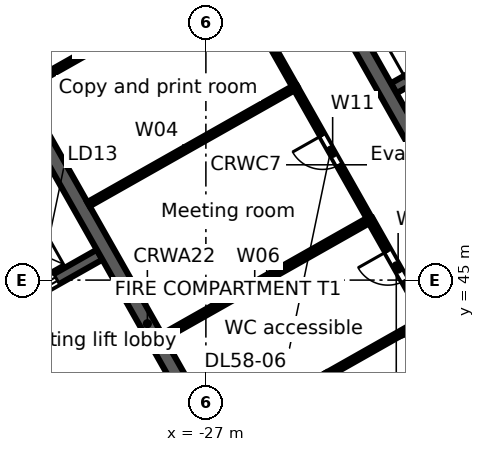
"""IFC4 building model, lengths in metres.
Left out: names, types, materials, properties, quantities, classifications, styles, units other than length and angle.
Written with IfcOpenShell. Run it as: python <this file> out.ifc"""

import sys

from ifc_helpers import new_model, si_unit, direction, frame, frame_2d, origin, place, context, subcontext, project, spatial, rectangle, extrude, element, fill, save


model = new_model("IFC4")
c1 = context("Model", 3, precision=1e-05, world=origin(), true_north=direction((0.0, 1.0)))
c2 = subcontext(c1, "Body", "Model", "MODEL_VIEW")
j1 = project(units=[si_unit("LENGTHUNIT", "METRE"), si_unit("PLANEANGLEUNIT", "RADIAN")], contexts=[c1])
p1 = place(None, origin())
s1 = spatial("IfcSite", under=j1, at=p1, CompositionType="ELEMENT")
p2 = place(p1, origin())
s2 = spatial("IfcBuilding", under=s1, at=p2, CompositionType="ELEMENT")
p3 = place(p2, frame((0.0, 0.0, 262.7)))
s3 = spatial("IfcBuildingStorey", under=s2, at=p3, CompositionType="ELEMENT", Elevation=262.7)
p4 = place(p3, frame((-58.732, 38.771, 0.0), z_axis=(0.0, 0.0, 1.0), x_axis=(0.870355615581, 0.492423702137, 0.0)))
e1 = element("IfcWall", 1, at=p4, inside=s3, PredefinedType="STANDARD", context=c2, shape_type="SweptSolid", body=[
    extrude(rectangle(XDim=64.052, YDim=0.25, at=frame_2d((32.026, 0.0))), origin(), (0.0, 0.0, 1.0), 3.52),
])
p5 = place(p4, frame((61.259, 0.0, 0.8)))
e2 = element("IfcOpeningElement", 2, at=p5, cuts=e1, PredefinedType="OPENING", context=c2, shape_type="SweptSolid", body=[
    extrude(rectangle(XDim=2.4, YDim=2.2, at=frame_2d((1.2, 1.1))), frame((0.0, 0.135, 0.0), z_axis=(0.0, -1.0, 0.0), x_axis=(1.0, 0.0, 0.0)), (0.0, 0.0, 1.0), 0.27),
])
p6 = place(p4, frame((58.216, 0.0, 0.8)))
e3 = element("IfcOpeningElement", 3, at=p6, cuts=e1, PredefinedType="OPENING", context=c2, shape_type="SweptSolid", body=[
    extrude(rectangle(XDim=2.4, YDim=2.2, at=frame_2d((1.2, 1.1))), frame((0.0, 0.135, 0.0), z_axis=(0.0, -1.0, 0.0), x_axis=(1.0, 0.0, 0.0)), (0.0, 0.0, 1.0), 0.27),
])
p7 = place(p4, frame((55.173, 0.0, 0.8)))
e4 = element("IfcOpeningElement", 4, at=p7, cuts=e1, PredefinedType="OPENING", context=c2, shape_type="SweptSolid", body=[
    extrude(rectangle(XDim=2.4, YDim=2.2, at=frame_2d((1.2, 1.1))), frame((0.0, 0.135, 0.0), z_axis=(0.0, -1.0, 0.0), x_axis=(1.0, 0.0, 0.0)), (0.0, 0.0, 1.0), 0.27),
])
p8 = place(p4, frame((52.129, 0.0, 0.8)))
e5 = element("IfcOpeningElement", 5, at=p8, cuts=e1, PredefinedType="OPENING", context=c2, shape_type="SweptSolid", body=[
    extrude(rectangle(XDim=2.4, YDim=2.2, at=frame_2d((1.2, 1.1))), frame((0.0, 0.135, 0.0), z_axis=(0.0, -1.0, 0.0), x_axis=(1.0, 0.0, 0.0)), (0.0, 0.0, 1.0), 0.27),
])
p9 = place(p4, frame((49.086, 0.0, 0.8)))
e6 = element("IfcOpeningElement", 6, at=p9, cuts=e1, PredefinedType="OPENING", context=c2, shape_type="SweptSolid", body=[
    extrude(rectangle(XDim=2.4, YDim=2.2, at=frame_2d((1.2, 1.1))), frame((0.0, 0.135, 0.0), z_axis=(0.0, -1.0, 0.0), x_axis=(1.0, 0.0, 0.0)), (0.0, 0.0, 1.0), 0.27),
])
p10 = place(p4, frame((46.043, 0.0, 0.8)))
e7 = element("IfcOpeningElement", 7, at=p10, cuts=e1, PredefinedType="OPENING", context=c2, shape_type="SweptSolid", body=[
    extrude(rectangle(XDim=2.4, YDim=2.2, at=frame_2d((1.2, 1.1))), frame((0.0, 0.135, 0.0), z_axis=(0.0, -1.0, 0.0), x_axis=(1.0, 0.0, 0.0)), (0.0, 0.0, 1.0), 0.27),
])
p11 = place(p4, frame((43.0, 0.0, 0.8)))
e8 = element("IfcOpeningElement", 8, at=p11, cuts=e1, PredefinedType="OPENING", context=c2, shape_type="SweptSolid", body=[
    extrude(rectangle(XDim=2.4, YDim=2.2, at=frame_2d((1.2, 1.1))), frame((0.0, 0.135, 0.0), z_axis=(0.0, -1.0, 0.0), x_axis=(1.0, 0.0, 0.0)), (0.0, 0.0, 1.0), 0.27),
])
p12 = place(p4, frame((39.956, 0.0, 0.8)))
e9 = element("IfcOpeningElement", 9, at=p12, cuts=e1, PredefinedType="OPENING", context=c2, shape_type="SweptSolid", body=[
    extrude(rectangle(XDim=2.4, YDim=2.2, at=frame_2d((1.2, 1.1))), frame((0.0, 0.135, 0.0), z_axis=(0.0, -1.0, 0.0), x_axis=(1.0, 0.0, 0.0)), (0.0, 0.0, 1.0), 0.27),
])
p13 = place(p4, frame((36.913, 0.0, 0.8)))
e10 = element("IfcOpeningElement", 10, at=p13, cuts=e1, PredefinedType="OPENING", context=c2, shape_type="SweptSolid", body=[
    extrude(rectangle(XDim=2.4, YDim=2.2, at=frame_2d((1.2, 1.1))), frame((0.0, 0.135, 0.0), z_axis=(0.0, -1.0, 0.0), x_axis=(1.0, 0.0, 0.0)), (0.0, 0.0, 1.0), 0.27),
])
p14 = place(p4, frame((33.87, 0.0, 0.8)))
e11 = element("IfcOpeningElement", 11, at=p14, cuts=e1, PredefinedType="OPENING", context=c2, shape_type="SweptSolid", body=[
    extrude(rectangle(XDim=2.4, YDim=2.2, at=frame_2d((1.2, 1.1))), frame((0.0, 0.135, 0.0), z_axis=(0.0, -1.0, 0.0), x_axis=(1.0, 0.0, 0.0)), (0.0, 0.0, 1.0), 0.27),
])
p15 = place(p4, frame((30.826, 0.0, 0.8)))
e12 = element("IfcOpeningElement", 12, at=p15, cuts=e1, PredefinedType="OPENING", context=c2, shape_type="SweptSolid", body=[
    extrude(rectangle(XDim=2.4, YDim=2.2, at=frame_2d((1.2, 1.1))), frame((0.0, 0.135, 0.0), z_axis=(0.0, -1.0, 0.0), x_axis=(1.0, 0.0, 0.0)), (0.0, 0.0, 1.0), 0.27),
])
p16 = place(p4, frame((27.783, 0.0, 0.8)))
e13 = element("IfcOpeningElement", 13, at=p16, cuts=e1, PredefinedType="OPENING", context=c2, shape_type="SweptSolid", body=[
    extrude(rectangle(XDim=2.4, YDim=2.2, at=frame_2d((1.2, 1.1))), frame((0.0, 0.135, 0.0), z_axis=(0.0, -1.0, 0.0), x_axis=(1.0, 0.0, 0.0)), (0.0, 0.0, 1.0), 0.27),
])
p17 = place(p4, frame((24.74, 0.0, 0.8)))
e14 = element("IfcOpeningElement", 14, at=p17, cuts=e1, PredefinedType="OPENING", context=c2, shape_type="SweptSolid", body=[
    extrude(rectangle(XDim=2.4, YDim=2.2, at=frame_2d((1.2, 1.1))), frame((0.0, 0.135, 0.0), z_axis=(0.0, -1.0, 0.0), x_axis=(1.0, 0.0, 0.0)), (0.0, 0.0, 1.0), 0.27),
])
p18 = place(p4, frame((21.696, 0.0, 0.8)))
e15 = element("IfcOpeningElement", 15, at=p18, cuts=e1, PredefinedType="OPENING", context=c2, shape_type="SweptSolid", body=[
    extrude(rectangle(XDim=2.4, YDim=2.2, at=frame_2d((1.2, 1.1))), frame((0.0, 0.135, 0.0), z_axis=(0.0, -1.0, 0.0), x_axis=(1.0, 0.0, 0.0)), (0.0, 0.0, 1.0), 0.27),
])
p19 = place(p4, frame((18.653, 0.0, 0.8)))
e16 = element("IfcOpeningElement", 16, at=p19, cuts=e1, PredefinedType="OPENING", context=c2, shape_type="SweptSolid", body=[
    extrude(rectangle(XDim=2.4, YDim=2.2, at=frame_2d((1.2, 1.1))), frame((0.0, 0.135, 0.0), z_axis=(0.0, -1.0, 0.0), x_axis=(1.0, 0.0, 0.0)), (0.0, 0.0, 1.0), 0.27),
])
p20 = place(p4, frame((15.61, 0.0, 0.8)))
e17 = element("IfcOpeningElement", 17, at=p20, cuts=e1, PredefinedType="OPENING", context=c2, shape_type="SweptSolid", body=[
    extrude(rectangle(XDim=2.4, YDim=2.2, at=frame_2d((1.2, 1.1))), frame((0.0, 0.135, 0.0), z_axis=(0.0, -1.0, 0.0), x_axis=(1.0, 0.0, 0.0)), (0.0, 0.0, 1.0), 0.27),
])
p21 = place(p4, frame((12.567, 0.0, 0.8)))
e18 = element("IfcOpeningElement", 18, at=p21, cuts=e1, PredefinedType="OPENING", context=c2, shape_type="SweptSolid", body=[
    extrude(rectangle(XDim=2.4, YDim=2.2, at=frame_2d((1.2, 1.1))), frame((0.0, 0.135, 0.0), z_axis=(0.0, -1.0, 0.0), x_axis=(1.0, 0.0, 0.0)), (0.0, 0.0, 1.0), 0.27),
])
p22 = place(p4, frame((9.523, 0.0, 0.8)))
e19 = element("IfcOpeningElement", 19, at=p22, cuts=e1, PredefinedType="OPENING", context=c2, shape_type="SweptSolid", body=[
    extrude(rectangle(XDim=2.4, YDim=2.2, at=frame_2d((1.2, 1.1))), frame((0.0, 0.135, 0.0), z_axis=(0.0, -1.0, 0.0), x_axis=(1.0, 0.0, 0.0)), (0.0, 0.0, 1.0), 0.27),
])
p23 = place(p4, frame((6.48, 0.0, 0.8)))
e20 = element("IfcOpeningElement", 20, at=p23, cuts=e1, PredefinedType="OPENING", context=c2, shape_type="SweptSolid", body=[
    extrude(rectangle(XDim=2.4, YDim=2.2, at=frame_2d((1.2, 1.1))), frame((0.0, 0.135, 0.0), z_axis=(0.0, -1.0, 0.0), x_axis=(1.0, 0.0, 0.0)), (0.0, 0.0, 1.0), 0.27),
])
p24 = place(p4, frame((3.437, 0.0, 0.8)))
e21 = element("IfcOpeningElement", 21, at=p24, cuts=e1, PredefinedType="OPENING", context=c2, shape_type="SweptSolid", body=[
    extrude(rectangle(XDim=2.4, YDim=2.2, at=frame_2d((1.2, 1.1))), frame((0.0, 0.135, 0.0), z_axis=(0.0, -1.0, 0.0), x_axis=(1.0, 0.0, 0.0)), (0.0, 0.0, 1.0), 0.27),
])
p25 = place(p4, frame((0.393, 0.0, 0.8)))
e22 = element("IfcOpeningElement", 22, at=p25, cuts=e1, PredefinedType="OPENING", context=c2, shape_type="SweptSolid", body=[
    extrude(rectangle(XDim=2.4, YDim=2.2, at=frame_2d((1.2, 1.1))), frame((0.0, 0.135, 0.0), z_axis=(0.0, -1.0, 0.0), x_axis=(1.0, 0.0, 0.0)), (0.0, 0.0, 1.0), 0.27),
])
p26 = place(p3, frame((-3.017, 46.293, 0.0), z_axis=(0.0, 0.0, 1.0), x_axis=(-0.870355474887, -0.492423950812, 0.0)))
e23 = element("IfcWall", 23, at=p26, inside=s3, PredefinedType="STANDARD", context=c2, shape_type="SweptSolid", body=[
    extrude(rectangle(XDim=40.34, YDim=0.25, at=frame_2d((20.17, 0.0))), origin(), (0.0, 0.0, 1.0), 3.52),
])
p27 = place(p26, frame((37.428, 0.0, 0.8)))
e24 = element("IfcOpeningElement", 24, at=p27, cuts=e23, PredefinedType="OPENING", context=c2, shape_type="SweptSolid", body=[
    extrude(rectangle(XDim=2.4, YDim=2.2, at=frame_2d((1.2, 1.1))), frame((0.0, 0.135, 0.0), z_axis=(0.0, -1.0, 0.0), x_axis=(1.0, 0.0, 0.0)), (0.0, 0.0, 1.0), 0.27),
])
p28 = place(p26, frame((34.372, 0.0, 0.0)))
e25 = element("IfcOpeningElement", 25, at=p28, cuts=e23, PredefinedType="OPENING", context=c2, shape_type="SweptSolid", body=[
    extrude(rectangle(XDim=1.8, YDim=2.4, at=frame_2d((0.9, 1.2))), frame((0.0, 0.135, 0.0), z_axis=(0.0, -1.0, 0.0), x_axis=(1.0, 0.0, 0.0)), (0.0, 0.0, 1.0), 0.27),
])
p29 = place(p26, frame((30.716, 0.0, 0.8)))
e26 = element("IfcOpeningElement", 26, at=p29, cuts=e23, PredefinedType="OPENING", context=c2, shape_type="SweptSolid", body=[
    extrude(rectangle(XDim=2.4, YDim=2.2, at=frame_2d((1.2, 1.1))), frame((0.0, 0.135, 0.0), z_axis=(0.0, -1.0, 0.0), x_axis=(1.0, 0.0, 0.0)), (0.0, 0.0, 1.0), 0.27),
])
p30 = place(p26, frame((27.36, 0.0, 0.8)))
e27 = element("IfcOpeningElement", 27, at=p30, cuts=e23, PredefinedType="OPENING", context=c2, shape_type="SweptSolid", body=[
    extrude(rectangle(XDim=2.4, YDim=2.2, at=frame_2d((1.2, 1.1))), frame((0.0, 0.135, 0.0), z_axis=(0.0, -1.0, 0.0), x_axis=(1.0, 0.0, 0.0)), (0.0, 0.0, 1.0), 0.27),
])
p31 = place(p26, frame((24.304, 0.0, 0.0)))
e28 = element("IfcOpeningElement", 28, at=p31, cuts=e23, PredefinedType="OPENING", context=c2, shape_type="SweptSolid", body=[
    extrude(rectangle(XDim=1.8, YDim=2.4, at=frame_2d((0.9, 1.2))), frame((0.0, 0.135, 0.0), z_axis=(0.0, -1.0, 0.0), x_axis=(1.0, 0.0, 0.0)), (0.0, 0.0, 1.0), 0.27),
])
p32 = place(p26, frame((20.648, 0.0, 0.8)))
e29 = element("IfcOpeningElement", 29, at=p32, cuts=e23, PredefinedType="OPENING", context=c2, shape_type="SweptSolid", body=[
    extrude(rectangle(XDim=2.4, YDim=2.2, at=frame_2d((1.2, 1.1))), frame((0.0, 0.135, 0.0), z_axis=(0.0, -1.0, 0.0), x_axis=(1.0, 0.0, 0.0)), (0.0, 0.0, 1.0), 0.27),
])
p33 = place(p26, frame((17.292, 0.0, 0.8)))
e30 = element("IfcOpeningElement", 30, at=p33, cuts=e23, PredefinedType="OPENING", context=c2, shape_type="SweptSolid", body=[
    extrude(rectangle(XDim=2.4, YDim=2.2, at=frame_2d((1.2, 1.1))), frame((0.0, 0.135, 0.0), z_axis=(0.0, -1.0, 0.0), x_axis=(1.0, 0.0, 0.0)), (0.0, 0.0, 1.0), 0.27),
])
p34 = place(p26, frame((14.236, 0.0, 0.0)))
e31 = element("IfcOpeningElement", 31, at=p34, cuts=e23, PredefinedType="OPENING", context=c2, shape_type="SweptSolid", body=[
    extrude(rectangle(XDim=1.8, YDim=2.4, at=frame_2d((0.9, 1.2))), frame((0.0, 0.135, 0.0), z_axis=(0.0, -1.0, 0.0), x_axis=(1.0, 0.0, 0.0)), (0.0, 0.0, 1.0), 0.27),
])
p35 = place(p26, frame((10.58, 0.0, 0.8)))
e32 = element("IfcOpeningElement", 32, at=p35, cuts=e23, PredefinedType="OPENING", context=c2, shape_type="SweptSolid", body=[
    extrude(rectangle(XDim=2.4, YDim=2.2, at=frame_2d((1.2, 1.1))), frame((0.0, 0.135, 0.0), z_axis=(0.0, -1.0, 0.0), x_axis=(1.0, 0.0, 0.0)), (0.0, 0.0, 1.0), 0.27),
])
p36 = place(p26, frame((7.224, 0.0, 0.8)))
e33 = element("IfcOpeningElement", 33, at=p36, cuts=e23, PredefinedType="OPENING", context=c2, shape_type="SweptSolid", body=[
    extrude(rectangle(XDim=2.4, YDim=2.2, at=frame_2d((1.2, 1.1))), frame((0.0, 0.135, 0.0), z_axis=(0.0, -1.0, 0.0), x_axis=(1.0, 0.0, 0.0)), (0.0, 0.0, 1.0), 0.27),
])
p37 = place(p26, frame((4.168, 0.0, 0.0)))
e34 = element("IfcOpeningElement", 34, at=p37, cuts=e23, PredefinedType="OPENING", context=c2, shape_type="SweptSolid", body=[
    extrude(rectangle(XDim=1.8, YDim=2.4, at=frame_2d((0.9, 1.2))), frame((0.0, 0.135, 0.0), z_axis=(0.0, -1.0, 0.0), x_axis=(1.0, 0.0, 0.0)), (0.0, 0.0, 1.0), 0.27),
])
p38 = place(p26, frame((0.512, 0.0, 0.8)))
e35 = element("IfcOpeningElement", 35, at=p38, cuts=e23, PredefinedType="OPENING", context=c2, shape_type="SweptSolid", body=[
    extrude(rectangle(XDim=2.4, YDim=2.2, at=frame_2d((1.2, 1.1))), frame((0.0, 0.135, 0.0), z_axis=(0.0, -1.0, 0.0), x_axis=(1.0, 0.0, 0.0)), (0.0, 0.0, 1.0), 0.27),
])
p39 = place(p3, frame((-37.282, 41.435, 0.0), z_axis=(0.0, 0.0, 1.0), x_axis=(0.870361315115, 0.492413628113, 0.0)))
e36 = element("IfcWall", 36, at=p39, inside=s3, PredefinedType="SOLIDWALL", context=c2, shape_type="SweptSolid", body=[
    extrude(rectangle(XDim=8.6, YDim=0.3, at=frame_2d((4.3, 0.0))), origin(), (0.0, 0.0, 1.0), 3.52),
])
p40 = place(p39, frame((0.65, 0.0, 0.0)))
e37 = element("IfcOpeningElement", 37, at=p40, cuts=e36, PredefinedType="OPENING", context=c2, shape_type="SweptSolid", body=[
    extrude(rectangle(XDim=1.1, YDim=2.1, at=frame_2d((0.55, 1.05))), frame((0.0, 0.16, 0.0), z_axis=(0.0, -1.0, 0.0), x_axis=(1.0, 0.0, 0.0)), (0.0, 0.0, 1.0), 0.32),
])
p41 = place(p39, frame((3.05, 0.0, 0.0)))
e38 = element("IfcOpeningElement", 38, at=p41, cuts=e36, PredefinedType="OPENING", context=c2, shape_type="SweptSolid", body=[
    extrude(rectangle(XDim=1.1, YDim=2.1, at=frame_2d((0.55, 1.05))), frame((0.0, 0.16, 0.0), z_axis=(0.0, -1.0, 0.0), x_axis=(1.0, 0.0, 0.0)), (0.0, 0.0, 1.0), 0.32),
])
p42 = place(p39, frame((6.2, 0.0, 0.0)))
e39 = element("IfcOpeningElement", 39, at=p42, cuts=e36, PredefinedType="OPENING", context=c2, shape_type="SweptSolid", body=[
    extrude(rectangle(XDim=1.1, YDim=2.1, at=frame_2d((0.55, 1.05))), frame((0.0, 0.16, 0.0), z_axis=(0.0, -1.0, 0.0), x_axis=(1.0, 0.0, 0.0)), (0.0, 0.0, 1.0), 0.32),
])
p43 = place(p3, frame((-33.031, 43.667, 0.0), z_axis=(0.0, 0.0, 1.0), x_axis=(0.492408451753, -0.87036424366, 0.0)))
e40 = element("IfcWall", 40, at=p43, inside=s3, PredefinedType="PARTITIONING", context=c2, shape_type="SweptSolid", body=[
    extrude(rectangle(XDim=4.1, YDim=0.2, at=frame_2d((2.05, 0.0))), origin(), (0.0, 0.0, 1.0), 3.52),
])
p44 = place(p43, frame((1.55, 0.0, 0.0)))
e41 = element("IfcOpeningElement", 41, at=p44, cuts=e40, PredefinedType="OPENING", context=c2, shape_type="SweptSolid", body=[
    extrude(rectangle(XDim=1.0, YDim=2.1, at=frame_2d((0.5, 1.05))), frame((0.0, 0.11, 0.0), z_axis=(0.0, -1.0, 0.0), x_axis=(1.0, 0.0, 0.0)), (0.0, 0.0, 1.0), 0.22),
])
p45 = place(p3, frame((-31.79, 49.597, 0.0), z_axis=(0.0, 0.0, 1.0), x_axis=(0.492421663121, -0.870356769198, 0.0)))
e42 = element("IfcWall", 42, at=p45, inside=s3, PredefinedType="SOLIDWALL", context=c2, shape_type="SweptSolid", body=[
    extrude(rectangle(XDim=13.2, YDim=0.4, at=frame_2d((6.6, 0.0))), origin(), (0.0, 0.0, 1.0), 3.52),
])
p46 = place(p3, frame((-22.059, 50.047, 0.0), z_axis=(0.0, 0.0, 1.0), x_axis=(0.87035077051, 0.49243226567, 0.0)))
e43 = element("IfcWall", 43, at=p46, inside=s3, PredefinedType="SOLIDWALL", context=c2, shape_type="SweptSolid", body=[
    extrude(rectangle(XDim=7.4, YDim=0.3, at=frame_2d((3.7, 0.0))), origin(), (0.0, 0.0, 1.0), 3.52),
])
p47 = place(p46, frame((0.4, 0.0, 0.0)))
e44 = element("IfcOpeningElement", 44, at=p47, cuts=e43, PredefinedType="OPENING", context=c2, shape_type="SweptSolid", body=[
    extrude(rectangle(XDim=1.0, YDim=2.1, at=frame_2d((0.5, 1.05))), frame((0.0, 0.16, 0.0), z_axis=(0.0, -1.0, 0.0), x_axis=(1.0, 0.0, 0.0)), (0.0, 0.0, 1.0), 0.32),
])
p48 = place(p3, frame((-24.4, 53.779, 0.0), z_axis=(0.0, 0.0, 1.0), x_axis=(0.492421663121, -0.870356769198, 0.0)))
e45 = element("IfcWall", 45, at=p48, inside=s3, PredefinedType="SOLIDWALL", context=c2, shape_type="SweptSolid", body=[
    extrude(rectangle(XDim=13.2, YDim=0.4, at=frame_2d((6.6, 0.0))), origin(), (0.0, 0.0, 1.0), 3.52),
])
p49 = place(p3, frame((-31.812, 50.044, 0.0), z_axis=(0.0, 0.0, 1.0), x_axis=(0.870309075431, 0.492505952474, 0.0)))
e46 = element("IfcWall", 46, at=p49, inside=s3, PredefinedType="PARTITIONING", context=c2, shape_type="SweptSolid", body=[
    extrude(rectangle(XDim=4.5, YDim=0.125, at=frame_2d((2.25, 0.0))), origin(), (0.0, 0.0, 1.0), 3.52),
])
p50 = place(p3, frame((-30.089, 46.998, 0.0), z_axis=(0.0, 0.0, 1.0), x_axis=(0.870424575418, 0.492301796167, 0.0)))
e47 = element("IfcWall", 47, at=p50, inside=s3, PredefinedType="PARTITIONING", context=c2, shape_type="SweptSolid", body=[
    extrude(rectangle(XDim=6.25, YDim=0.125, at=frame_2d((3.125, 0.0))), origin(), (0.0, 0.0, 1.0), 3.52),
])
p51 = place(p3, frame((-28.119, 43.516, 0.0), z_axis=(0.0, 0.0, 1.0), x_axis=(0.870310250913, 0.49250387527, 0.0)))
e48 = element("IfcWall", 48, at=p51, inside=s3, PredefinedType="PARTITIONING", context=c2, shape_type="SweptSolid", body=[
    extrude(rectangle(XDim=6.25, YDim=0.15, at=frame_2d((3.125, 0.0))), origin(), (0.0, 0.0, 1.0), 2.792),
])
p52 = place(p3, frame((-26.373, 53.122, 0.0), z_axis=(0.0, 0.0, 1.0), x_axis=(0.492454723656, -0.870338063714, 0.0)))
e49 = element("IfcWall", 49, at=p52, inside=s3, PredefinedType="PARTITIONING", context=c2, shape_type="SweptSolid", body=[
    extrude(rectangle(XDim=3.501, YDim=0.125, at=frame_2d((1.75, 0.0))), origin(), (0.0, 0.0, 1.0), 3.52),
])
p53 = place(p52, frame((1.2, 0.0, 0.0)))
e50 = element("IfcOpeningElement", 50, at=p53, cuts=e49, PredefinedType="OPENING", context=c2, shape_type="SweptSolid", body=[
    extrude(rectangle(XDim=0.9, YDim=2.1, at=frame_2d((0.45, 1.05))), frame((0.0, 0.073, 0.0), z_axis=(0.0, -1.0, 0.0), x_axis=(1.0, 0.0, 0.0)), (0.0, 0.0, 1.0), 0.145),
])
p54 = place(p3, frame((-24.649, 50.075, 0.0), z_axis=(0.0, 0.0, 1.0), x_axis=(0.492340861121, -0.870402479587, 0.0)))
e51 = element("IfcWall", 51, at=p54, inside=s3, PredefinedType="PARTITIONING", context=c2, shape_type="SweptSolid", body=[
    extrude(rectangle(XDim=3.999, YDim=0.125, at=frame_2d((2.0, 0.0))), origin(), (0.0, 0.0, 1.0), 2.792),
])
p55 = place(p54, frame((1.45, 0.0, 0.0)))
e52 = element("IfcOpeningElement", 52, at=p55, cuts=e51, PredefinedType="OPENING", context=c2, shape_type="SweptSolid", body=[
    extrude(rectangle(XDim=0.9, YDim=2.1, at=frame_2d((0.45, 1.05))), frame((0.0, 0.073, 0.0), z_axis=(0.0, -1.0, 0.0), x_axis=(1.0, 0.0, 0.0)), (0.0, 0.0, 1.0), 0.145),
])
p56 = place(p3, frame((-23.813, 42.506, 0.0), z_axis=(0.0, 0.0, 1.0), x_axis=(0.870423351516, 0.492303960105, 0.0)))
e53 = element("IfcWall", 53, at=p56, inside=s3, PredefinedType="PARTITIONING", context=c2, shape_type="SweptSolid", body=[
    extrude(rectangle(XDim=3.0, YDim=0.125, at=frame_2d((1.5, 0.0))), origin(), (0.0, 0.0, 1.0), 3.52),
])
p57 = place(p3, frame((-22.68, 46.594, 0.0), z_axis=(0.0, 0.0, 1.0), x_axis=(0.492612172641, -0.870248957119, 0.0)))
e54 = element("IfcWall", 54, at=p57, inside=s3, PredefinedType="PARTITIONING", context=c2, shape_type="SweptSolid", body=[
    extrude(rectangle(XDim=3.0, YDim=0.15, at=frame_2d((1.5, 0.0))), origin(), (0.0, 0.0, 1.0), 3.52),
])
p58 = place(p57, frame((0.95, 0.0, 0.0)))
e55 = element("IfcOpeningElement", 55, at=p58, cuts=e54, PredefinedType="OPENING", context=c2, shape_type="SweptSolid", body=[
    extrude(rectangle(XDim=0.9, YDim=2.1, at=frame_2d((0.45, 1.05))), frame((0.0, 0.085, 0.0), z_axis=(0.0, -1.0, 0.0), x_axis=(1.0, 0.0, 0.0)), (0.0, 0.0, 1.0), 0.17),
])
p59 = place(p42, origin())
e56 = element("IfcDoor", 56, at=p59, inside=s3, OperationType="DOUBLE_DOOR_SLIDING", PredefinedType="DOOR", context=c2, shape_type="SweptSolid", body=[
    extrude(rectangle(XDim=1.1, YDim=2.1, at=frame_2d((0.55, 1.05))), frame((0.0, 0.025, 0.0), z_axis=(0.0, -1.0, 0.0), x_axis=(1.0, 0.0, 0.0)), (0.0, 0.0, 1.0), 0.05),
])
fill(e39, e56)
p60 = place(p58, frame((0.9, 0.0, 0.0), z_axis=(0.0, 0.0, 1.0), x_axis=(-1.0, 0.0, 0.0)))
e57 = element("IfcDoor", 57, at=p60, inside=s3, OperationType="SINGLE_SWING_RIGHT", PredefinedType="DOOR", context=c2, shape_type="SweptSolid", body=[
    extrude(rectangle(XDim=0.9, YDim=2.1, at=frame_2d((0.45, 1.05))), frame((0.0, 0.025, 0.0), z_axis=(0.0, -1.0, 0.0), x_axis=(1.0, 0.0, 0.0)), (0.0, 0.0, 1.0), 0.05),
])
fill(e55, e57)
p61 = place(p55, frame((0.9, 0.0, 0.0), z_axis=(0.0, 0.0, 1.0), x_axis=(-1.0, 0.0, 0.0)))
e58 = element("IfcDoor", 58, at=p61, inside=s3, OperationType="SINGLE_SWING_RIGHT", PredefinedType="DOOR", context=c2, shape_type="SweptSolid", body=[
    extrude(rectangle(XDim=0.9, YDim=2.1, at=frame_2d((0.45, 1.05))), frame((0.0, 0.025, 0.0), z_axis=(0.0, -1.0, 0.0), x_axis=(1.0, 0.0, 0.0)), (0.0, 0.0, 1.0), 0.05),
])
fill(e52, e58)
save(model, sys.argv[1])
